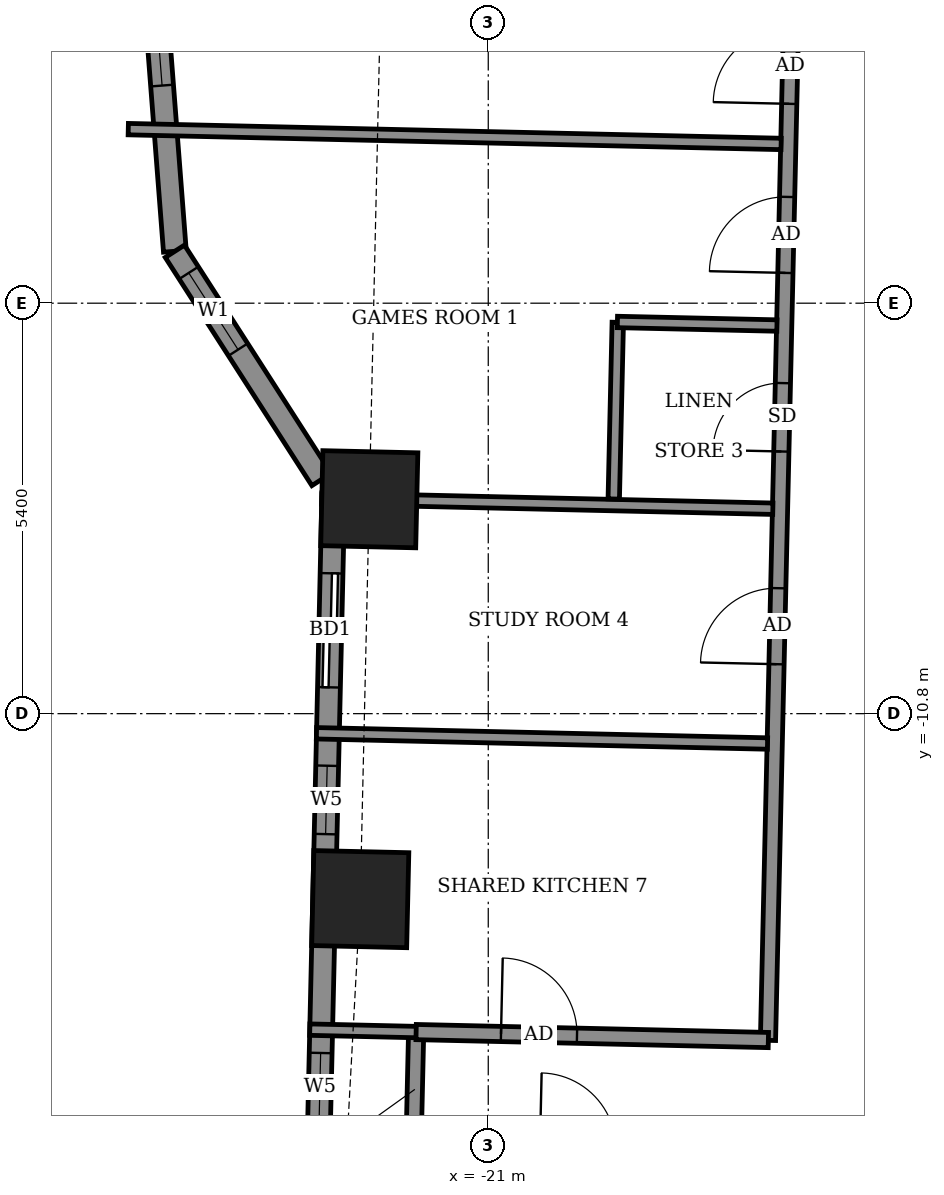
"""IFC4 building model, lengths in metres.
Left out: names, types, materials, properties, quantities, classifications, styles, units other than length and angle.
Written with IfcOpenShell. Run it as: python <this file> out.ifc"""

import sys

from ifc_helpers import new_model, si_unit, direction, frame, frame_2d, origin, origin_2d, place, context, subcontext, project, spatial, rectangle, extrude, element, fill, save


model = new_model("IFC4")
c1 = context("Model", 3, precision=1e-05, world=origin(), true_north=direction((0.0, 1.0)))
c2 = subcontext(c1, "Body", "Model", "MODEL_VIEW")
j1 = project(units=[si_unit("LENGTHUNIT", "METRE"), si_unit("PLANEANGLEUNIT", "RADIAN")], contexts=[c1])
p1 = place(None, origin())
s1 = spatial("IfcSite", under=j1, at=p1, CompositionType="ELEMENT")
p2 = place(p1, origin())
s2 = spatial("IfcBuilding", under=s1, at=p2, CompositionType="ELEMENT")
p3 = place(p2, frame((0.0, 0.0, 163.5)))
s3 = spatial("IfcBuildingStorey", under=s2, at=p3, CompositionType="ELEMENT", Elevation=163.5)
for number, where, z_axis, x_axis in (
    (1, (-22.565, -7.979, -0.55), (0.0, 0.0, 1.0), (-0.023, -1.0, 0.0)),
    (2, (-22.684, -13.24, -0.55), (0.0, 0.0, 1.0), (-0.023, -1.0, 0.0)),
):
    element("IfcColumn", number, at=place(p3, frame(where, z_axis=z_axis, x_axis=x_axis)), inside=s3, PredefinedType="COLUMN", context=c2, shape_type="SweptSolid", body=[
        extrude(rectangle(XDim=1.25, YDim=1.25, at=origin_2d()), origin(), (0.0, 0.0, 1.0), 3.6),
    ])
p4 = place(p3, frame((-25.552, 0.84, 0.0), z_axis=(0.0, 0.0, 1.0), x_axis=(0.076961115238, -0.997034095075, 0.0)))
e3 = element("IfcWall", 3, at=p4, inside=s3, PredefinedType="SOLIDWALL", context=c2, shape_type="SweptSolid", body=[
    extrude(rectangle(XDim=5.574, YDim=0.3, at=frame_2d((2.787, 0.0))), origin(), (0.0, 0.0, 1.0), 3.05),
])
p5 = place(p4, frame((2.187, 0.0, 0.9)))
e4 = element("IfcOpeningElement", 4, at=p5, cuts=e3, PredefinedType="OPENING", context=c2, shape_type="SweptSolid", body=[
    extrude(rectangle(XDim=1.2, YDim=1.5, at=frame_2d((0.6, 0.75))), frame((0.0, 0.16, 0.0), z_axis=(0.0, -1.0, 0.0), x_axis=(1.0, 0.0, 0.0)), (0.0, 0.0, 1.0), 0.32),
])
p6 = place(p3, frame((-25.123, -4.717, 0.0), z_axis=(0.0, 0.0, 1.0), x_axis=(0.54058467792, -0.841289608873, 0.0)))
e5 = element("IfcWall", 5, at=p6, inside=s3, PredefinedType="SOLIDWALL", context=c2, shape_type="SweptSolid", body=[
    extrude(rectangle(XDim=3.568, YDim=0.3, at=frame_2d((1.784, 0.0))), origin(), (0.0, 0.0, 1.0), 3.05),
])
p7 = place(p6, frame((0.338, 0.0, 0.9)))
e6 = element("IfcOpeningElement", 6, at=p7, cuts=e5, PredefinedType="OPENING", context=c2, shape_type="SweptSolid", body=[
    extrude(rectangle(XDim=1.2, YDim=1.5, at=frame_2d((0.6, 0.75))), frame((0.0, 0.16, 0.0), z_axis=(0.0, -1.0, 0.0), x_axis=(1.0, 0.0, 0.0)), (0.0, 0.0, 1.0), 0.32),
])
p8 = place(p3, frame((-23.038, -7.913, 0.0), z_axis=(0.0, 0.0, 1.0), x_axis=(-0.022705985163, -0.999742185885, 0.0)))
e7 = element("IfcWall", 7, at=p8, inside=s3, PredefinedType="SOLIDWALL", context=c2, shape_type="SweptSolid", body=[
    extrude(rectangle(XDim=10.43, YDim=0.3, at=frame_2d((5.215, 0.0))), origin(), (0.0, 0.0, 1.0), 3.05),
])
p9 = place(p8, frame((1.041, 0.0, 0.0)))
e8 = element("IfcOpeningElement", 8, at=p9, cuts=e7, PredefinedType="OPENING", context=c2, shape_type="SweptSolid", body=[
    extrude(rectangle(XDim=1.5, YDim=2.4, at=frame_2d((0.75, 1.2))), frame((0.0, 0.16, 0.0), z_axis=(0.0, -1.0, 0.0), x_axis=(1.0, 0.0, 0.0)), (0.0, 0.0, 1.0), 0.32),
])
p10 = place(p8, frame((3.573, 0.0, 0.9)))
e9 = element("IfcOpeningElement", 9, at=p10, cuts=e7, PredefinedType="OPENING", context=c2, shape_type="SweptSolid", body=[
    extrude(rectangle(XDim=0.9, YDim=1.5, at=frame_2d((0.45, 0.75))), frame((0.0, 0.16, 0.0), z_axis=(0.0, -1.0, 0.0), x_axis=(1.0, 0.0, 0.0)), (0.0, 0.0, 1.0), 0.32),
])
p11 = place(p8, frame((7.353, 0.0, 0.9)))
e10 = element("IfcOpeningElement", 10, at=p11, cuts=e7, PredefinedType="OPENING", context=c2, shape_type="SweptSolid", body=[
    extrude(rectangle(XDim=0.9, YDim=1.5, at=frame_2d((0.45, 0.75))), frame((0.0, 0.16, 0.0), z_axis=(0.0, -1.0, 0.0), x_axis=(1.0, 0.0, 0.0)), (0.0, 0.0, 1.0), 0.32),
])
p12 = place(p3, frame((-26.043, -18.427, 0.0), z_axis=(0.0, 0.0, 1.0), x_axis=(0.022620270121, 0.999744128955, 0.0)))
e11 = element("IfcWall", 11, at=p12, inside=s3, PredefinedType="USERDEFINED", context=c2, shape_type="SweptSolid", body=[
    extrude(rectangle(XDim=3.4, YDim=0.55, at=frame_2d((1.7, 0.0))), origin(), (0.0, 0.0, 1.0), 0.8),
])
p13 = place(p3, frame((-21.983, -16.493, 0.0), z_axis=(0.0, 0.0, 1.0), x_axis=(0.022617910375, 0.999744182344, 0.0)))
e12 = element("IfcWall", 12, at=p13, inside=s3, PredefinedType="PARTITIONING", context=c2, shape_type="SweptSolid", body=[
    extrude(rectangle(XDim=1.5, YDim=0.2, at=frame_2d((0.75, 0.0))), origin(), (0.0, 0.0, 1.0), 3.05),
])
p14 = place(p3, frame((-17.32, -15.098, 0.0), z_axis=(0.0, 0.0, 1.0), x_axis=(0.022694293906, 0.999742451346, 0.0)))
e13 = element("IfcWall", 13, at=p14, inside=s3, PredefinedType="PARTITIONING", context=c2, shape_type="SweptSolid", body=[
    extrude(rectangle(XDim=28.024, YDim=0.2, at=frame_2d((14.012, 0.0))), origin(), (0.0, 0.0, 1.0), 3.05),
])
p15 = place(p14, frame((21.174, 0.0, 0.0)))
e14 = element("IfcOpeningElement", 14, at=p15, cuts=e13, PredefinedType="OPENING", context=c2, shape_type="SweptSolid", body=[
    extrude(rectangle(XDim=1.0, YDim=2.1, at=frame_2d((0.5, 1.05))), frame((0.0, 0.11, 0.0), z_axis=(0.0, -1.0, 0.0), x_axis=(1.0, 0.0, 0.0)), (0.0, 0.0, 1.0), 0.22),
])
p16 = place(p14, frame((23.349, 0.0, 0.0)))
e15 = element("IfcOpeningElement", 15, at=p16, cuts=e13, PredefinedType="OPENING", context=c2, shape_type="SweptSolid", body=[
    extrude(rectangle(XDim=0.9, YDim=2.1, at=frame_2d((0.45, 1.05))), frame((0.0, 0.11, 0.0), z_axis=(0.0, -1.0, 0.0), x_axis=(1.0, 0.0, 0.0)), (0.0, 0.0, 1.0), 0.22),
])
p17 = place(p14, frame((16.899, 0.0, 0.0)))
e16 = element("IfcOpeningElement", 16, at=p17, cuts=e13, PredefinedType="OPENING", context=c2, shape_type="SweptSolid", body=[
    extrude(rectangle(XDim=1.0, YDim=2.1, at=frame_2d((0.5, 1.05))), frame((0.0, 0.11, 0.0), z_axis=(0.0, -1.0, 0.0), x_axis=(1.0, 0.0, 0.0)), (0.0, 0.0, 1.0), 0.22),
])
p18 = place(p14, frame((19.099, 0.0, 0.0)))
e17 = element("IfcOpeningElement", 17, at=p18, cuts=e13, PredefinedType="OPENING", context=c2, shape_type="SweptSolid", body=[
    extrude(rectangle(XDim=0.9, YDim=2.1, at=frame_2d((0.45, 1.05))), frame((0.0, 0.11, 0.0), z_axis=(0.0, -1.0, 0.0), x_axis=(1.0, 0.0, 0.0)), (0.0, 0.0, 1.0), 0.22),
])
p19 = place(p14, frame((12.324, 0.0, 0.0)))
e18 = element("IfcOpeningElement", 18, at=p19, cuts=e13, PredefinedType="OPENING", context=c2, shape_type="SweptSolid", body=[
    extrude(rectangle(XDim=1.0, YDim=2.1, at=frame_2d((0.5, 1.05))), frame((0.0, 0.11, 0.0), z_axis=(0.0, -1.0, 0.0), x_axis=(1.0, 0.0, 0.0)), (0.0, 0.0, 1.0), 0.22),
])
p20 = place(p14, frame((14.699, 0.0, 0.0)))
e19 = element("IfcOpeningElement", 19, at=p20, cuts=e13, PredefinedType="OPENING", context=c2, shape_type="SweptSolid", body=[
    extrude(rectangle(XDim=0.9, YDim=2.1, at=frame_2d((0.45, 1.05))), frame((0.0, 0.11, 0.0), z_axis=(0.0, -1.0, 0.0), x_axis=(1.0, 0.0, 0.0)), (0.0, 0.0, 1.0), 0.22),
])
p21 = place(p14, frame((10.099, 0.0, 0.0)))
e20 = element("IfcOpeningElement", 20, at=p21, cuts=e13, PredefinedType="OPENING", context=c2, shape_type="SweptSolid", body=[
    extrude(rectangle(XDim=1.0, YDim=2.1, at=frame_2d((0.5, 1.05))), frame((0.0, 0.11, 0.0), z_axis=(0.0, -1.0, 0.0), x_axis=(1.0, 0.0, 0.0)), (0.0, 0.0, 1.0), 0.22),
])
p22 = place(p14, frame((7.749, 0.0, 0.0)))
e21 = element("IfcOpeningElement", 21, at=p22, cuts=e13, PredefinedType="OPENING", context=c2, shape_type="SweptSolid", body=[
    extrude(rectangle(XDim=0.9, YDim=2.1, at=frame_2d((0.45, 1.05))), frame((0.0, 0.11, 0.0), z_axis=(0.0, -1.0, 0.0), x_axis=(1.0, 0.0, 0.0)), (0.0, 0.0, 1.0), 0.22),
])
p23 = place(p14, frame((4.95, 0.0, 0.0)))
e22 = element("IfcOpeningElement", 22, at=p23, cuts=e13, PredefinedType="OPENING", context=c2, shape_type="SweptSolid", body=[
    extrude(rectangle(XDim=1.0, YDim=2.1, at=frame_2d((0.5, 1.05))), frame((0.0, 0.11, 0.0), z_axis=(0.0, -1.0, 0.0), x_axis=(1.0, 0.0, 0.0)), (0.0, 0.0, 1.0), 0.22),
])
p24 = place(p3, frame((-23.348, -14.957, 0.0), z_axis=(0.0, 0.0, 1.0), x_axis=(0.999740216184, -0.022792545827, 0.0)))
e23 = element("IfcWall", 23, at=p24, inside=s3, PredefinedType="PARTITIONING", context=c2, shape_type="SweptSolid", body=[
    extrude(rectangle(XDim=1.403, YDim=0.15, at=frame_2d((0.702, 0.0))), origin(), (0.0, 0.0, 1.0), 2.55),
])
p25 = place(p3, frame((-21.949, -14.989, 0.0), z_axis=(0.0, 0.0, 1.0), x_axis=(0.999743491588, -0.022648422179, 0.0)))
e24 = element("IfcWall", 24, at=p25, inside=s3, PredefinedType="PARTITIONING", context=c2, shape_type="SweptSolid", body=[
    extrude(rectangle(XDim=4.635, YDim=0.2, at=frame_2d((2.318, 0.0))), origin(), (0.0, 0.0, 1.0), 3.05),
])
p26 = place(p25, frame((1.117, 0.0, 0.0)))
e25 = element("IfcOpeningElement", 25, at=p26, cuts=e24, PredefinedType="OPENING", context=c2, shape_type="SweptSolid", body=[
    extrude(rectangle(XDim=1.0, YDim=2.1, at=frame_2d((0.5, 1.05))), frame((0.0, 0.11, 0.0), z_axis=(0.0, -1.0, 0.0), x_axis=(1.0, 0.0, 0.0)), (0.0, 0.0, 1.0), 0.22),
])
p27 = place(p3, frame((-23.26, -11.058, 0.0), z_axis=(0.0, 0.0, 1.0), x_axis=(0.99974128315, -0.022745697753, 0.0)))
e26 = element("IfcWall", 26, at=p27, inside=s3, PredefinedType="PARTITIONING", context=c2, shape_type="SweptSolid", body=[
    extrude(rectangle(XDim=5.936, YDim=0.15, at=frame_2d((2.968, 0.0))), origin(), (0.0, 0.0, 1.0), 2.55),
])
p28 = place(p3, frame((-23.19, -7.969, 0.0), z_axis=(0.0, 0.0, 1.0), x_axis=(0.999741261868, -0.022746633113, 0.0)))
e27 = element("IfcWall", 27, at=p28, inside=s3, PredefinedType="PARTITIONING", context=c2, shape_type="SweptSolid", body=[
    extrude(rectangle(XDim=5.935, YDim=0.15, at=frame_2d((2.968, 0.0))), origin(), (0.0, 0.0, 1.0), 3.05),
])
p29 = place(p3, frame((-19.349, -7.976, 0.0), z_axis=(0.0, 0.0, 1.0), x_axis=(0.022895561926, 0.999737862264, 0.0)))
e28 = element("IfcWall", 28, at=p29, inside=s3, PredefinedType="PARTITIONING", context=c2, shape_type="SweptSolid", body=[
    extrude(rectangle(XDim=2.324, YDim=0.15, at=frame_2d((1.162, 0.0))), origin(), (0.0, 0.0, 1.0), 3.05),
])
p30 = place(p3, frame((-19.301, -5.647, 0.0), z_axis=(0.0, 0.0, 1.0), x_axis=(0.999748159451, -0.022441427631, 0.0)))
e29 = element("IfcWall", 29, at=p30, inside=s3, PredefinedType="PARTITIONING", context=c2, shape_type="SweptSolid", body=[
    extrude(rectangle(XDim=2.1, YDim=0.15, at=frame_2d((1.05, 0.0))), origin(), (0.0, 0.0, 1.0), 3.05),
])
p31 = place(p3, frame((-25.736, -3.11, 0.0), z_axis=(0.0, 0.0, 1.0), x_axis=(0.99974284683, -0.02267686512, 0.0)))
e30 = element("IfcWall", 30, at=p31, inside=s3, PredefinedType="PARTITIONING", context=c2, shape_type="SweptSolid", body=[
    extrude(rectangle(XDim=8.591, YDim=0.15, at=frame_2d((4.296, 0.0))), origin(), (0.0, 0.0, 1.0), 2.05),
])
p32 = place(p5, origin())
e31 = element("IfcWindow", 31, at=p32, inside=s3, PartitioningType="SINGLE_PANEL", PredefinedType="WINDOW", context=c2, shape_type="SweptSolid", body=[
    extrude(rectangle(XDim=1.2, YDim=1.5, at=frame_2d((0.6, 0.75))), frame((0.0, 0.03, 0.0), z_axis=(0.0, -1.0, 0.0), x_axis=(1.0, 0.0, 0.0)), (0.0, 0.0, 1.0), 0.06),
])
fill(e4, e31)
p33 = place(p7, origin())
e32 = element("IfcWindow", 32, at=p33, inside=s3, PartitioningType="SINGLE_PANEL", PredefinedType="WINDOW", context=c2, shape_type="SweptSolid", body=[
    extrude(rectangle(XDim=1.2, YDim=1.5, at=frame_2d((0.6, 0.75))), frame((0.0, 0.03, 0.0), z_axis=(0.0, -1.0, 0.0), x_axis=(1.0, 0.0, 0.0)), (0.0, 0.0, 1.0), 0.06),
])
fill(e6, e32)
p34 = place(p9, origin())
e33 = element("IfcDoor", 33, at=p34, inside=s3, OperationType="SLIDING_TO_LEFT", PredefinedType="DOOR", context=c2, shape_type="SweptSolid", body=[
    extrude(rectangle(XDim=1.5, YDim=2.4, at=frame_2d((0.75, 1.2))), frame((0.0, 0.025, 0.0), z_axis=(0.0, -1.0, 0.0), x_axis=(1.0, 0.0, 0.0)), (0.0, 0.0, 1.0), 0.05),
])
fill(e8, e33)
p35 = place(p10, origin())
e34 = element("IfcWindow", 34, at=p35, inside=s3, PartitioningType="SINGLE_PANEL", PredefinedType="WINDOW", context=c2, shape_type="SweptSolid", body=[
    extrude(rectangle(XDim=0.9, YDim=1.5, at=frame_2d((0.45, 0.75))), frame((0.0, 0.03, 0.0), z_axis=(0.0, -1.0, 0.0), x_axis=(1.0, 0.0, 0.0)), (0.0, 0.0, 1.0), 0.06),
])
fill(e9, e34)
p36 = place(p11, origin())
e35 = element("IfcWindow", 35, at=p36, inside=s3, PartitioningType="SINGLE_PANEL", PredefinedType="WINDOW", context=c2, shape_type="SweptSolid", body=[
    extrude(rectangle(XDim=0.9, YDim=1.5, at=frame_2d((0.45, 0.75))), frame((0.0, 0.03, 0.0), z_axis=(0.0, -1.0, 0.0), x_axis=(1.0, 0.0, 0.0)), (0.0, 0.0, 1.0), 0.06),
])
fill(e10, e35)
p37 = place(p19, origin())
e36 = element("IfcDoor", 36, at=p37, inside=s3, OperationType="SINGLE_SWING_LEFT", PredefinedType="DOOR", context=c2, shape_type="SweptSolid", body=[
    extrude(rectangle(XDim=1.0, YDim=2.1, at=frame_2d((0.5, 1.05))), frame((0.0, 0.025, 0.0), z_axis=(0.0, -1.0, 0.0), x_axis=(1.0, 0.0, 0.0)), (0.0, 0.0, 1.0), 0.05),
])
fill(e18, e36)
p38 = place(p21, origin())
e37 = element("IfcDoor", 37, at=p38, inside=s3, OperationType="SINGLE_SWING_RIGHT", PredefinedType="DOOR", context=c2, shape_type="SweptSolid", body=[
    extrude(rectangle(XDim=1.0, YDim=2.1, at=frame_2d((0.5, 1.05))), frame((0.0, 0.025, 0.0), z_axis=(0.0, -1.0, 0.0), x_axis=(1.0, 0.0, 0.0)), (0.0, 0.0, 1.0), 0.05),
])
fill(e20, e37)
p39 = place(p22, origin())
e38 = element("IfcDoor", 38, at=p39, inside=s3, OperationType="SINGLE_SWING_LEFT", PredefinedType="DOOR", context=c2, shape_type="SweptSolid", body=[
    extrude(rectangle(XDim=0.9, YDim=2.1, at=frame_2d((0.45, 1.05))), frame((0.0, 0.025, 0.0), z_axis=(0.0, -1.0, 0.0), x_axis=(1.0, 0.0, 0.0)), (0.0, 0.0, 1.0), 0.05),
])
fill(e21, e38)
p40 = place(p23, origin())
e39 = element("IfcDoor", 39, at=p40, inside=s3, OperationType="SINGLE_SWING_LEFT", PredefinedType="DOOR", context=c2, shape_type="SweptSolid", body=[
    extrude(rectangle(XDim=1.0, YDim=2.1, at=frame_2d((0.5, 1.05))), frame((0.0, 0.025, 0.0), z_axis=(0.0, -1.0, 0.0), x_axis=(1.0, 0.0, 0.0)), (0.0, 0.0, 1.0), 0.05),
])
fill(e22, e39)
p41 = place(p26, origin())
e40 = element("IfcDoor", 40, at=p41, inside=s3, OperationType="SINGLE_SWING_RIGHT", PredefinedType="DOOR", context=c2, shape_type="SweptSolid", body=[
    extrude(rectangle(XDim=1.0, YDim=2.1, at=frame_2d((0.5, 1.05))), frame((0.0, 0.025, 0.0), z_axis=(0.0, -1.0, 0.0), x_axis=(1.0, 0.0, 0.0)), (0.0, 0.0, 1.0), 0.05),
])
fill(e25, e40)
save(model, sys.argv[1])
